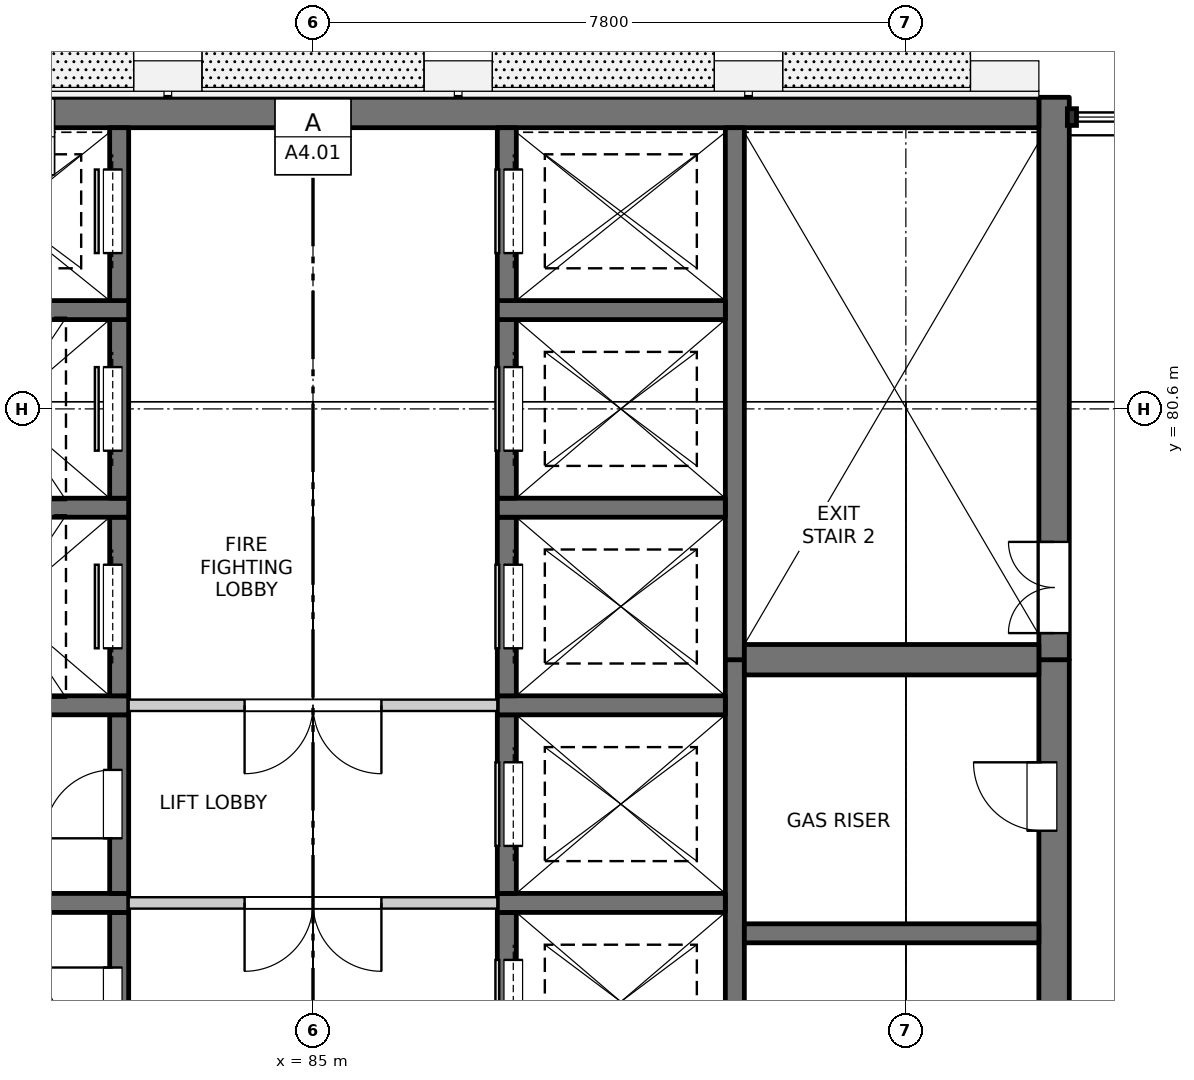
"""IFC4 building model, lengths in metres.
Left out: names, types, materials, properties, quantities, classifications, styles, units other than length and angle.
Written with IfcOpenShell. Run it as: python <this file> out.ifc"""

import sys

from ifc_helpers import new_model, si_unit, direction, frame, frame_2d, origin, place, context, subcontext, project, spatial, rectangle, extrude, element, fill, save


model = new_model("IFC4")
c1 = context("Model", 3, precision=1e-05, world=origin(), true_north=direction((0.0, 1.0)))
c2 = subcontext(c1, "Body", "Model", "MODEL_VIEW")
j1 = project(units=[si_unit("LENGTHUNIT", "METRE"), si_unit("PLANEANGLEUNIT", "RADIAN")], contexts=[c1])
p1 = place(None, origin())
s1 = spatial("IfcSite", under=j1, at=p1, CompositionType="ELEMENT")
p2 = place(p1, origin())
s2 = spatial("IfcBuilding", under=s1, at=p2, CompositionType="ELEMENT")
p3 = place(p2, frame((0.0, 0.0, 266.4)))
s3 = spatial("IfcBuildingStorey", under=s2, at=p3, CompositionType="ELEMENT", Elevation=266.4)
p4 = place(p3, frame((94.75, 61.95, -0.3), z_axis=(0.0, 0.0, 1.0), x_axis=(0.0, 1.0, 0.0)))
e1 = element("IfcWall", 1, at=p4, inside=s3, PredefinedType="SOLIDWALL", context=c2, shape_type="SweptSolid", body=[
    extrude(rectangle(XDim=15.35, YDim=0.4, at=frame_2d((7.675, 0.0))), origin(), (0.0, 0.0, 1.0), 6.0),
])
p5 = place(p4, frame((0.925, 0.0, 0.3)))
e2 = element("IfcOpeningElement", 2, at=p5, cuts=e1, PredefinedType="OPENING", context=c2, shape_type="SweptSolid", body=[
    extrude(rectangle(XDim=0.9, YDim=2.1, at=frame_2d((0.45, 1.05))), frame((0.0, 0.21, 0.0), z_axis=(0.0, -1.0, 0.0), x_axis=(1.0, 0.0, 0.0)), (0.0, 0.0, 1.0), 0.42),
])
p6 = place(p4, frame((3.8, 0.0, 0.3)))
e3 = element("IfcOpeningElement", 3, at=p6, cuts=e1, PredefinedType="OPENING", context=c2, shape_type="SweptSolid", body=[
    extrude(rectangle(XDim=0.9, YDim=2.1, at=frame_2d((0.45, 1.05))), frame((0.0, 0.21, 0.0), z_axis=(0.0, -1.0, 0.0), x_axis=(1.0, 0.0, 0.0)), (0.0, 0.0, 1.0), 0.42),
])
p7 = place(p4, frame((8.3, 0.0, 0.3)))
e4 = element("IfcOpeningElement", 4, at=p7, cuts=e1, PredefinedType="OPENING", context=c2, shape_type="SweptSolid", body=[
    extrude(rectangle(XDim=0.9, YDim=2.1, at=frame_2d((0.45, 1.05))), frame((0.0, 0.21, 0.0), z_axis=(0.0, -1.0, 0.0), x_axis=(1.0, 0.0, 0.0)), (0.0, 0.0, 1.0), 0.42),
])
p8 = place(p4, frame((13.1, 0.0, 0.3)))
e5 = element("IfcOpeningElement", 5, at=p8, cuts=e1, PredefinedType="OPENING", context=c2, shape_type="SweptSolid", body=[
    extrude(rectangle(XDim=0.9, YDim=2.1, at=frame_2d((0.45, 1.05))), frame((0.0, 0.21, 0.0), z_axis=(0.0, -1.0, 0.0), x_axis=(1.0, 0.0, 0.0)), (0.0, 0.0, 1.0), 0.42),
])
p9 = place(p3, frame((94.75, 77.3, -0.3), z_axis=(0.0, 0.0, 1.0), x_axis=(0.0, 1.0, 0.0)))
e6 = element("IfcWall", 6, at=p9, inside=s3, PredefinedType="SOLIDWALL", context=c2, shape_type="SweptSolid", body=[
    extrude(rectangle(XDim=7.4, YDim=0.4, at=frame_2d((3.7, 0.0))), origin(), (0.0, 0.0, 1.0), 6.0),
])
p10 = place(p9, frame((0.35, 0.0, 0.3)))
e7 = element("IfcOpeningElement", 7, at=p10, cuts=e6, PredefinedType="OPENING", context=c2, shape_type="SweptSolid", body=[
    extrude(rectangle(XDim=1.2, YDim=2.1, at=frame_2d((0.6, 1.05))), frame((0.0, 0.21, 0.0), z_axis=(0.0, -1.0, 0.0), x_axis=(1.0, 0.0, 0.0)), (0.0, 0.0, 1.0), 0.42),
])
p11 = place(p3, frame((75.45, 84.5, -0.3), z_axis=(0.0, 0.0, 1.0), x_axis=(1.0, 0.0, 0.0)))
e8 = element("IfcWall", 8, at=p11, inside=s3, PredefinedType="SOLIDWALL", context=c2, shape_type="SweptSolid", body=[
    extrude(rectangle(XDim=19.1, YDim=0.4, at=frame_2d((9.55, 0.0))), origin(), (0.0, 0.0, 1.0), 6.0),
])
p12 = place(p3, frame((90.55, 61.95, -0.3), z_axis=(0.0, 0.0, 1.0), x_axis=(0.0, 1.0, 0.0)))
e9 = element("IfcWall", 9, at=p12, inside=s3, PredefinedType="SOLIDWALL", context=c2, shape_type="SweptSolid", body=[
    extrude(rectangle(XDim=15.35, YDim=0.25, at=frame_2d((7.675, 0.0))), origin(), (0.0, 0.0, 1.0), 6.0),
])
p13 = place(p3, frame((90.55, 77.3, -0.3), z_axis=(0.0, 0.0, 1.0), x_axis=(0.0, 1.0, 0.0)))
e10 = element("IfcWall", 10, at=p13, inside=s3, PredefinedType="SOLIDWALL", context=c2, shape_type="SweptSolid", body=[
    extrude(rectangle(XDim=7.0, YDim=0.25, at=frame_2d((3.5, 0.0))), origin(), (0.0, 0.0, 1.0), 6.0),
])
p14 = place(p3, frame((82.45, 71.625, -0.3), z_axis=(0.0, 0.0, 1.0), x_axis=(0.0, 1.0, 0.0)))
e11 = element("IfcWall", 11, at=p14, inside=s3, PredefinedType="SOLIDWALL", context=c2, shape_type="SweptSolid", body=[
    extrude(rectangle(XDim=2.35, YDim=0.25, at=frame_2d((1.175, 0.0))), origin(), (0.0, 0.0, 1.0), 6.0),
])
p15 = place(p14, frame((0.725, 0.0, 0.3)))
e12 = element("IfcOpeningElement", 12, at=p15, cuts=e11, PredefinedType="OPENING", context=c2, shape_type="SweptSolid", body=[
    extrude(rectangle(XDim=0.9, YDim=2.1, at=frame_2d((0.45, 1.05))), frame((0.0, 0.135, 0.0), z_axis=(0.0, -1.0, 0.0), x_axis=(1.0, 0.0, 0.0)), (0.0, 0.0, 1.0), 0.27),
])
p16 = place(p3, frame((79.575, 74.1, -0.3), z_axis=(0.0, 0.0, 1.0), x_axis=(1.0, 0.0, 0.0)))
e13 = element("IfcWall", 13, at=p16, inside=s3, PredefinedType="SOLIDWALL", context=c2, shape_type="SweptSolid", body=[
    extrude(rectangle(XDim=3.0, YDim=0.25, at=frame_2d((1.5, 0.0))), origin(), (0.0, 0.0, 1.0), 6.0),
])
p17 = place(p3, frame((82.45, 74.225, -0.3), z_axis=(0.0, 0.0, 1.0), x_axis=(0.0, 1.0, 0.0)))
e14 = element("IfcWall", 14, at=p17, inside=s3, PredefinedType="SOLIDWALL", context=c2, shape_type="SweptSolid", body=[
    extrude(rectangle(XDim=2.35, YDim=0.25, at=frame_2d((1.175, 0.0))), origin(), (0.0, 0.0, 1.0), 6.0),
])
p18 = place(p17, frame((0.725, 0.0, 0.3)))
e15 = element("IfcOpeningElement", 15, at=p18, cuts=e14, PredefinedType="OPENING", context=c2, shape_type="SweptSolid", body=[
    extrude(rectangle(XDim=0.9, YDim=2.1, at=frame_2d((0.45, 1.05))), frame((0.0, 0.135, 0.0), z_axis=(0.0, -1.0, 0.0), x_axis=(1.0, 0.0, 0.0)), (0.0, 0.0, 1.0), 0.27),
])
p19 = place(p3, frame((79.575, 76.7, -0.3), z_axis=(0.0, 0.0, 1.0), x_axis=(1.0, 0.0, 0.0)))
e16 = element("IfcWall", 16, at=p19, inside=s3, PredefinedType="SOLIDWALL", context=c2, shape_type="SweptSolid", body=[
    extrude(rectangle(XDim=3.0, YDim=0.25, at=frame_2d((1.5, 0.0))), origin(), (0.0, 0.0, 1.0), 6.0),
])
p20 = place(p3, frame((82.45, 76.825, -0.3), z_axis=(0.0, 0.0, 1.0), x_axis=(0.0, 1.0, 0.0)))
e17 = element("IfcWall", 17, at=p20, inside=s3, PredefinedType="SOLIDWALL", context=c2, shape_type="SweptSolid", body=[
    extrude(rectangle(XDim=2.35, YDim=0.25, at=frame_2d((1.175, 0.0))), origin(), (0.0, 0.0, 1.0), 6.0),
])
p21 = place(p20, frame((0.625, 0.0, 0.3)))
e18 = element("IfcOpeningElement", 18, at=p21, cuts=e17, PredefinedType="OPENING", context=c2, shape_type="SweptSolid", body=[
    extrude(rectangle(XDim=1.1, YDim=2.1, at=frame_2d((0.55, 1.05))), frame((0.0, 0.135, 0.0), z_axis=(0.0, -1.0, 0.0), x_axis=(1.0, 0.0, 0.0)), (0.0, 0.0, 1.0), 0.27),
])
p22 = place(p3, frame((79.575, 79.3, -0.3), z_axis=(0.0, 0.0, 1.0), x_axis=(1.0, 0.0, 0.0)))
e19 = element("IfcWall", 19, at=p22, inside=s3, PredefinedType="SOLIDWALL", context=c2, shape_type="SweptSolid", body=[
    extrude(rectangle(XDim=3.0, YDim=0.25, at=frame_2d((1.5, 0.0))), origin(), (0.0, 0.0, 1.0), 6.0),
])
p23 = place(p3, frame((82.45, 79.425, -0.3), z_axis=(0.0, 0.0, 1.0), x_axis=(0.0, 1.0, 0.0)))
e20 = element("IfcWall", 20, at=p23, inside=s3, PredefinedType="SOLIDWALL", context=c2, shape_type="SweptSolid", body=[
    extrude(rectangle(XDim=2.35, YDim=0.25, at=frame_2d((1.175, 0.0))), origin(), (0.0, 0.0, 1.0), 6.0),
])
p24 = place(p23, frame((0.625, 0.0, 0.3)))
e21 = element("IfcOpeningElement", 21, at=p24, cuts=e20, PredefinedType="OPENING", context=c2, shape_type="SweptSolid", body=[
    extrude(rectangle(XDim=1.1, YDim=2.1, at=frame_2d((0.55, 1.05))), frame((0.0, 0.135, 0.0), z_axis=(0.0, -1.0, 0.0), x_axis=(1.0, 0.0, 0.0)), (0.0, 0.0, 1.0), 0.27),
])
p25 = place(p3, frame((79.575, 81.9, -0.3), z_axis=(0.0, 0.0, 1.0), x_axis=(1.0, 0.0, 0.0)))
e22 = element("IfcWall", 22, at=p25, inside=s3, PredefinedType="SOLIDWALL", context=c2, shape_type="SweptSolid", body=[
    extrude(rectangle(XDim=3.0, YDim=0.25, at=frame_2d((1.5, 0.0))), origin(), (0.0, 0.0, 1.0), 6.0),
])
p26 = place(p3, frame((82.45, 82.025, -0.3), z_axis=(0.0, 0.0, 1.0), x_axis=(0.0, 1.0, 0.0)))
e23 = element("IfcWall", 23, at=p26, inside=s3, PredefinedType="SOLIDWALL", context=c2, shape_type="SweptSolid", body=[
    extrude(rectangle(XDim=2.275, YDim=0.25, at=frame_2d((1.138, 0.0))), origin(), (0.0, 0.0, 1.0), 6.0),
])
p27 = place(p26, frame((0.625, 0.0, 0.3)))
e24 = element("IfcOpeningElement", 24, at=p27, cuts=e23, PredefinedType="OPENING", context=c2, shape_type="SweptSolid", body=[
    extrude(rectangle(XDim=1.1, YDim=2.1, at=frame_2d((0.55, 1.05))), frame((0.0, 0.135, 0.0), z_axis=(0.0, -1.0, 0.0), x_axis=(1.0, 0.0, 0.0)), (0.0, 0.0, 1.0), 0.27),
])
p28 = place(p3, frame((87.55, 71.625, -0.3), z_axis=(0.0, 0.0, 1.0), x_axis=(0.0, 1.0, 0.0)))
e25 = element("IfcWall", 25, at=p28, inside=s3, PredefinedType="SOLIDWALL", context=c2, shape_type="SweptSolid", body=[
    extrude(rectangle(XDim=2.35, YDim=0.25, at=frame_2d((1.175, 0.0))), origin(), (0.0, 0.0, 1.0), 6.0),
])
p29 = place(p28, frame((0.625, 0.0, 0.3)))
e26 = element("IfcOpeningElement", 26, at=p29, cuts=e25, PredefinedType="OPENING", context=c2, shape_type="SweptSolid", body=[
    extrude(rectangle(XDim=1.1, YDim=2.1, at=frame_2d((0.55, 1.05))), frame((0.0, 0.135, 0.0), z_axis=(0.0, -1.0, 0.0), x_axis=(1.0, 0.0, 0.0)), (0.0, 0.0, 1.0), 0.27),
])
p30 = place(p3, frame((87.425, 74.1, -0.3), z_axis=(0.0, 0.0, 1.0), x_axis=(1.0, 0.0, 0.0)))
e27 = element("IfcWall", 27, at=p30, inside=s3, PredefinedType="SOLIDWALL", context=c2, shape_type="SweptSolid", body=[
    extrude(rectangle(XDim=3.0, YDim=0.25, at=frame_2d((1.5, 0.0))), origin(), (0.0, 0.0, 1.0), 6.0),
])
p31 = place(p3, frame((87.55, 74.225, -0.3), z_axis=(0.0, 0.0, 1.0), x_axis=(0.0, 1.0, 0.0)))
e28 = element("IfcWall", 28, at=p31, inside=s3, PredefinedType="SOLIDWALL", context=c2, shape_type="SweptSolid", body=[
    extrude(rectangle(XDim=2.35, YDim=0.25, at=frame_2d((1.175, 0.0))), origin(), (0.0, 0.0, 1.0), 6.0),
])
p32 = place(p31, frame((0.625, 0.0, 0.3)))
e29 = element("IfcOpeningElement", 29, at=p32, cuts=e28, PredefinedType="OPENING", context=c2, shape_type="SweptSolid", body=[
    extrude(rectangle(XDim=1.1, YDim=2.1, at=frame_2d((0.55, 1.05))), frame((0.0, 0.135, 0.0), z_axis=(0.0, -1.0, 0.0), x_axis=(1.0, 0.0, 0.0)), (0.0, 0.0, 1.0), 0.27),
])
p33 = place(p3, frame((87.425, 76.7, -0.3), z_axis=(0.0, 0.0, 1.0), x_axis=(1.0, 0.0, 0.0)))
e30 = element("IfcWall", 30, at=p33, inside=s3, PredefinedType="SOLIDWALL", context=c2, shape_type="SweptSolid", body=[
    extrude(rectangle(XDim=3.0, YDim=0.25, at=frame_2d((1.5, 0.0))), origin(), (0.0, 0.0, 1.0), 6.0),
])
p34 = place(p3, frame((87.55, 76.825, -0.3), z_axis=(0.0, 0.0, 1.0), x_axis=(0.0, 1.0, 0.0)))
e31 = element("IfcWall", 31, at=p34, inside=s3, PredefinedType="SOLIDWALL", context=c2, shape_type="SweptSolid", body=[
    extrude(rectangle(XDim=2.35, YDim=0.25, at=frame_2d((1.175, 0.0))), origin(), (0.0, 0.0, 1.0), 6.0),
])
p35 = place(p34, frame((0.625, 0.0, 0.3)))
e32 = element("IfcOpeningElement", 32, at=p35, cuts=e31, PredefinedType="OPENING", context=c2, shape_type="SweptSolid", body=[
    extrude(rectangle(XDim=1.1, YDim=2.1, at=frame_2d((0.55, 1.05))), frame((0.0, 0.135, 0.0), z_axis=(0.0, -1.0, 0.0), x_axis=(1.0, 0.0, 0.0)), (0.0, 0.0, 1.0), 0.27),
])
p36 = place(p3, frame((87.425, 79.3, -0.3), z_axis=(0.0, 0.0, 1.0), x_axis=(1.0, 0.0, 0.0)))
e33 = element("IfcWall", 33, at=p36, inside=s3, PredefinedType="SOLIDWALL", context=c2, shape_type="SweptSolid", body=[
    extrude(rectangle(XDim=3.0, YDim=0.25, at=frame_2d((1.5, 0.0))), origin(), (0.0, 0.0, 1.0), 6.0),
])
p37 = place(p3, frame((87.55, 79.425, -0.3), z_axis=(0.0, 0.0, 1.0), x_axis=(0.0, 1.0, 0.0)))
e34 = element("IfcWall", 34, at=p37, inside=s3, PredefinedType="SOLIDWALL", context=c2, shape_type="SweptSolid", body=[
    extrude(rectangle(XDim=2.35, YDim=0.25, at=frame_2d((1.175, 0.0))), origin(), (0.0, 0.0, 1.0), 6.0),
])
p38 = place(p37, frame((0.625, 0.0, 0.3)))
e35 = element("IfcOpeningElement", 35, at=p38, cuts=e34, PredefinedType="OPENING", context=c2, shape_type="SweptSolid", body=[
    extrude(rectangle(XDim=1.1, YDim=2.1, at=frame_2d((0.55, 1.05))), frame((0.0, 0.135, 0.0), z_axis=(0.0, -1.0, 0.0), x_axis=(1.0, 0.0, 0.0)), (0.0, 0.0, 1.0), 0.27),
])
p39 = place(p3, frame((87.425, 81.9, -0.3), z_axis=(0.0, 0.0, 1.0), x_axis=(1.0, 0.0, 0.0)))
e36 = element("IfcWall", 36, at=p39, inside=s3, PredefinedType="SOLIDWALL", context=c2, shape_type="SweptSolid", body=[
    extrude(rectangle(XDim=3.0, YDim=0.25, at=frame_2d((1.5, 0.0))), origin(), (0.0, 0.0, 1.0), 6.0),
])
p40 = place(p3, frame((87.55, 82.025, -0.3), z_axis=(0.0, 0.0, 1.0), x_axis=(0.0, 1.0, 0.0)))
e37 = element("IfcWall", 37, at=p40, inside=s3, PredefinedType="SOLIDWALL", context=c2, shape_type="SweptSolid", body=[
    extrude(rectangle(XDim=2.275, YDim=0.25, at=frame_2d((1.138, 0.0))), origin(), (0.0, 0.0, 1.0), 6.0),
])
p41 = place(p40, frame((0.625, 0.0, 0.3)))
e38 = element("IfcOpeningElement", 38, at=p41, cuts=e37, PredefinedType="OPENING", context=c2, shape_type="SweptSolid", body=[
    extrude(rectangle(XDim=1.1, YDim=2.1, at=frame_2d((0.55, 1.05))), frame((0.0, 0.135, 0.0), z_axis=(0.0, -1.0, 0.0), x_axis=(1.0, 0.0, 0.0)), (0.0, 0.0, 1.0), 0.27),
])
p42 = place(p3, frame((90.675, 73.7, -0.3), z_axis=(0.0, 0.0, 1.0), x_axis=(1.0, 0.0, 0.0)))
e39 = element("IfcWall", 39, at=p42, inside=s3, PredefinedType="SOLIDWALL", context=c2, shape_type="SweptSolid", body=[
    extrude(rectangle(XDim=3.875, YDim=0.25, at=frame_2d((1.938, 0.0))), origin(), (0.0, 0.0, 1.0), 6.0),
])
p43 = place(p3, frame((90.675, 77.3, -0.3), z_axis=(0.0, 0.0, 1.0), x_axis=(1.0, 0.0, 0.0)))
e40 = element("IfcWall", 40, at=p43, inside=s3, PredefinedType="SOLIDWALL", context=c2, shape_type="SweptSolid", body=[
    extrude(rectangle(XDim=3.875, YDim=0.4, at=frame_2d((1.938, 0.0))), origin(), (0.0, 0.0, 1.0), 6.0),
])
p44 = place(p3, frame((82.575, 74.1, 0.0), z_axis=(0.0, 0.0, 1.0), x_axis=(1.0, 0.0, 0.0)))
e41 = element("IfcWall", 41, at=p44, inside=s3, PredefinedType="PARTITIONING", context=c2, shape_type="SweptSolid", body=[
    extrude(rectangle(XDim=4.85, YDim=0.15, at=frame_2d((2.425, 0.0))), origin(), (0.0, 0.0, 1.0), 5.7),
])
p45 = place(p44, frame((1.525, 0.0, 0.0)))
e42 = element("IfcOpeningElement", 42, at=p45, cuts=e41, PredefinedType="OPENING", context=c2, shape_type="SweptSolid", body=[
    extrude(rectangle(XDim=1.8, YDim=2.1, at=frame_2d((0.9, 1.05))), frame((0.0, 0.085, 0.0), z_axis=(0.0, -1.0, 0.0), x_axis=(1.0, 0.0, 0.0)), (0.0, 0.0, 1.0), 0.17),
])
p46 = place(p3, frame((82.575, 76.7, 0.0), z_axis=(0.0, 0.0, 1.0), x_axis=(1.0, 0.0, 0.0)))
e43 = element("IfcWall", 43, at=p46, inside=s3, PredefinedType="PARTITIONING", context=c2, shape_type="SweptSolid", body=[
    extrude(rectangle(XDim=4.85, YDim=0.15, at=frame_2d((2.425, 0.0))), origin(), (0.0, 0.0, 1.0), 5.7),
])
p47 = place(p46, frame((1.525, 0.0, 0.0)))
e44 = element("IfcOpeningElement", 44, at=p47, cuts=e43, PredefinedType="OPENING", context=c2, shape_type="SweptSolid", body=[
    extrude(rectangle(XDim=1.8, YDim=2.1, at=frame_2d((0.9, 1.05))), frame((0.0, 0.085, 0.0), z_axis=(0.0, -1.0, 0.0), x_axis=(1.0, 0.0, 0.0)), (0.0, 0.0, 1.0), 0.17),
])
p48 = place(p10, origin())
e45 = element("IfcDoor", 45, at=p48, inside=s3, OperationType="DOUBLE_DOOR_SINGLE_SWING", PredefinedType="DOOR", context=c2, shape_type="SweptSolid", body=[
    extrude(rectangle(XDim=1.2, YDim=2.1, at=frame_2d((0.6, 1.05))), frame((0.0, 0.025, 0.0), z_axis=(0.0, -1.0, 0.0), x_axis=(1.0, 0.0, 0.0)), (0.0, 0.0, 1.0), 0.05),
])
fill(e7, e45)
p49 = place(p15, origin())
e46 = element("IfcDoor", 46, at=p49, inside=s3, OperationType="SINGLE_SWING_RIGHT", PredefinedType="DOOR", context=c2, shape_type="SweptSolid", body=[
    extrude(rectangle(XDim=0.9, YDim=2.1, at=frame_2d((0.45, 1.05))), frame((0.0, 0.11, 0.0), z_axis=(0.0, -1.0, 0.0), x_axis=(1.0, 0.0, 0.0)), (0.0, 0.0, 1.0), 0.05),
])
fill(e12, e46)
p50 = place(p29, origin())
e47 = element("IfcDoor", 47, at=p50, inside=s3, OperationType="SLIDING_TO_LEFT", PredefinedType="DOOR", context=c2, shape_type="SweptSolid", body=[
    extrude(rectangle(XDim=1.1, YDim=2.1, at=frame_2d((0.55, 1.05))), frame((0.0, -0.06, 0.0), z_axis=(0.0, -1.0, 0.0), x_axis=(1.0, 0.0, 0.0)), (0.0, 0.0, 1.0), 0.05),
])
fill(e26, e47)
p51 = place(p45, origin())
e48 = element("IfcDoor", 48, at=p51, inside=s3, OperationType="DOUBLE_DOOR_SINGLE_SWING", PredefinedType="DOOR", context=c2, shape_type="SweptSolid", body=[
    extrude(rectangle(XDim=1.8, YDim=2.1, at=frame_2d((0.9, 1.05))), frame((0.0, 0.025, 0.0), z_axis=(0.0, -1.0, 0.0), x_axis=(1.0, 0.0, 0.0)), (0.0, 0.0, 1.0), 0.05),
])
fill(e42, e48)
p52 = place(p18, origin())
e49 = element("IfcDoor", 49, at=p52, inside=s3, OperationType="SINGLE_SWING_LEFT", PredefinedType="DOOR", context=c2, shape_type="SweptSolid", body=[
    extrude(rectangle(XDim=0.9, YDim=2.1, at=frame_2d((0.45, 1.05))), frame((0.0, 0.11, 0.0), z_axis=(0.0, -1.0, 0.0), x_axis=(1.0, 0.0, 0.0)), (0.0, 0.0, 1.0), 0.05),
])
fill(e15, e49)
p53 = place(p32, origin())
e50 = element("IfcDoor", 50, at=p53, inside=s3, OperationType="SLIDING_TO_LEFT", PredefinedType="DOOR", context=c2, shape_type="SweptSolid", body=[
    extrude(rectangle(XDim=1.1, YDim=2.1, at=frame_2d((0.55, 1.05))), frame((0.0, -0.06, 0.0), z_axis=(0.0, -1.0, 0.0), x_axis=(1.0, 0.0, 0.0)), (0.0, 0.0, 1.0), 0.05),
])
fill(e29, e50)
p54 = place(p8, origin())
e51 = element("IfcDoor", 51, at=p54, inside=s3, OperationType="SINGLE_SWING_RIGHT", PredefinedType="DOOR", context=c2, shape_type="SweptSolid", body=[
    extrude(rectangle(XDim=0.9, YDim=2.1, at=frame_2d((0.45, 1.05))), frame((0.0, 0.185, 0.0), z_axis=(0.0, -1.0, 0.0), x_axis=(1.0, 0.0, 0.0)), (0.0, 0.0, 1.0), 0.05),
])
fill(e5, e51)
p55 = place(p47, origin())
e52 = element("IfcDoor", 52, at=p55, inside=s3, OperationType="DOUBLE_DOOR_SINGLE_SWING", PredefinedType="DOOR", context=c2, shape_type="SweptSolid", body=[
    extrude(rectangle(XDim=1.8, YDim=2.1, at=frame_2d((0.9, 1.05))), frame((0.0, 0.025, 0.0), z_axis=(0.0, -1.0, 0.0), x_axis=(1.0, 0.0, 0.0)), (0.0, 0.0, 1.0), 0.05),
])
fill(e44, e52)
p56 = place(p21, origin())
e53 = element("IfcDoor", 53, at=p56, inside=s3, OperationType="SLIDING_TO_LEFT", PredefinedType="DOOR", context=c2, shape_type="SweptSolid", body=[
    extrude(rectangle(XDim=1.1, YDim=2.1, at=frame_2d((0.55, 1.05))), frame((0.0, 0.11, 0.0), z_axis=(0.0, -1.0, 0.0), x_axis=(1.0, 0.0, 0.0)), (0.0, 0.0, 1.0), 0.05),
])
fill(e18, e53)
p57 = place(p35, origin())
e54 = element("IfcDoor", 54, at=p57, inside=s3, OperationType="SLIDING_TO_LEFT", PredefinedType="DOOR", context=c2, shape_type="SweptSolid", body=[
    extrude(rectangle(XDim=1.1, YDim=2.1, at=frame_2d((0.55, 1.05))), frame((0.0, -0.06, 0.0), z_axis=(0.0, -1.0, 0.0), x_axis=(1.0, 0.0, 0.0)), (0.0, 0.0, 1.0), 0.05),
])
fill(e32, e54)
p58 = place(p24, origin())
e55 = element("IfcDoor", 55, at=p58, inside=s3, OperationType="SLIDING_TO_LEFT", PredefinedType="DOOR", context=c2, shape_type="SweptSolid", body=[
    extrude(rectangle(XDim=1.1, YDim=2.1, at=frame_2d((0.55, 1.05))), frame((0.0, 0.11, 0.0), z_axis=(0.0, -1.0, 0.0), x_axis=(1.0, 0.0, 0.0)), (0.0, 0.0, 1.0), 0.05),
])
fill(e21, e55)
p59 = place(p38, origin())
e56 = element("IfcDoor", 56, at=p59, inside=s3, OperationType="SLIDING_TO_RIGHT", PredefinedType="DOOR", context=c2, shape_type="SweptSolid", body=[
    extrude(rectangle(XDim=1.1, YDim=2.1, at=frame_2d((0.55, 1.05))), frame((0.0, -0.06, 0.0), z_axis=(0.0, -1.0, 0.0), x_axis=(1.0, 0.0, 0.0)), (0.0, 0.0, 1.0), 0.05),
])
fill(e35, e56)
p60 = place(p27, origin())
e57 = element("IfcDoor", 57, at=p60, inside=s3, OperationType="SLIDING_TO_RIGHT", PredefinedType="DOOR", context=c2, shape_type="SweptSolid", body=[
    extrude(rectangle(XDim=1.1, YDim=2.1, at=frame_2d((0.55, 1.05))), frame((0.0, 0.11, 0.0), z_axis=(0.0, -1.0, 0.0), x_axis=(1.0, 0.0, 0.0)), (0.0, 0.0, 1.0), 0.05),
])
fill(e24, e57)
p61 = place(p41, origin())
e58 = element("IfcDoor", 58, at=p61, inside=s3, OperationType="SLIDING_TO_RIGHT", PredefinedType="DOOR", context=c2, shape_type="SweptSolid", body=[
    extrude(rectangle(XDim=1.1, YDim=2.1, at=frame_2d((0.55, 1.05))), frame((0.0, -0.06, 0.0), z_axis=(0.0, -1.0, 0.0), x_axis=(1.0, 0.0, 0.0)), (0.0, 0.0, 1.0), 0.05),
])
fill(e38, e58)
save(model, sys.argv[1])
